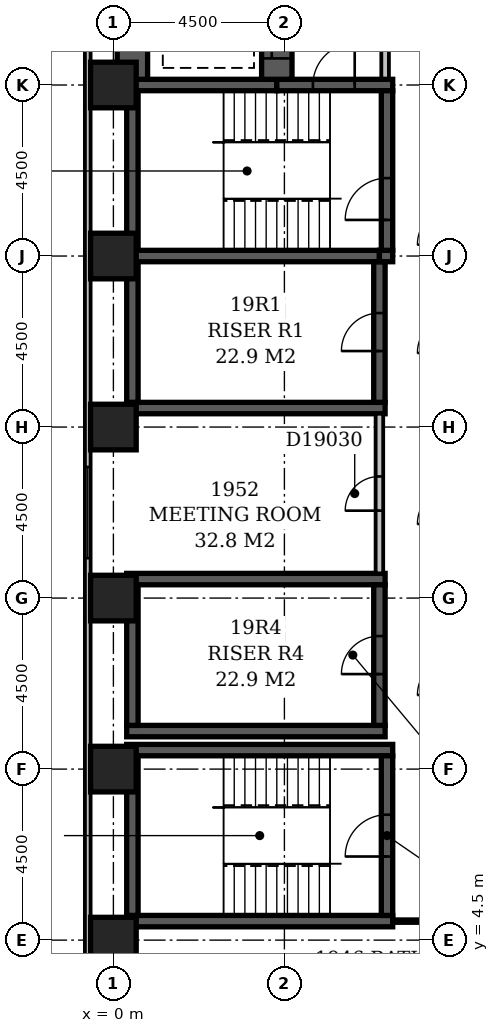
"""IFC4 building model, lengths in metres.
Left out: names, types, materials, properties, quantities, classifications, styles, units other than length and angle.
Written with IfcOpenShell. Run it as: python <this file> out.ifc"""

import sys

from ifc_helpers import new_model, si_unit, direction, frame, frame_2d, origin, origin_2d, place, context, subcontext, project, spatial, rectangle, extrude, element, fill, save


model = new_model("IFC4")
c1 = context("Model", 3, precision=1e-05, world=origin(), true_north=direction((0.0, 1.0)))
c2 = subcontext(c1, "Body", "Model", "MODEL_VIEW")
j1 = project(units=[si_unit("LENGTHUNIT", "METRE"), si_unit("PLANEANGLEUNIT", "RADIAN")], contexts=[c1])
p1 = place(None, origin())
s1 = spatial("IfcSite", under=j1, at=p1, CompositionType="ELEMENT")
p2 = place(p1, origin())
s2 = spatial("IfcBuilding", under=s1, at=p2, CompositionType="ELEMENT")
p3 = place(p2, frame((0.0, 0.0, 79.4)))
s3 = spatial("IfcBuildingStorey", under=s2, at=p3, CompositionType="ELEMENT", Elevation=79.4)
for number, where, z_axis, x_axis in (
    (1, (0.35, 5.0, -0.3), (0.0, 0.0, 1.0), (1.0, 0.0, 0.0)),
    (2, (0.35, 9.5, -0.3), (0.0, 0.0, 1.0), (1.0, 0.0, 0.0)),
):
    element("IfcWall", number, at=place(p3, frame(where, z_axis=z_axis, x_axis=x_axis)), inside=s3, PredefinedType="SHEAR", context=c2, shape_type="SweptSolid", body=[
        extrude(rectangle(XDim=7.0, YDim=0.3, at=frame_2d((3.5, 0.0))), origin(), (0.0, 0.0, 1.0), 3.6),
    ])
for number, where, z_axis, x_axis in (
    (3, (0.35, 10.0, -0.3), (0.0, 0.0, 1.0), (1.0, 0.0, 0.0)),
    (4, (0.35, 14.0, -0.3), (0.0, 0.0, 1.0), (1.0, 0.0, 0.0)),
    (5, (0.35, 18.5, -0.3), (0.0, 0.0, 1.0), (1.0, 0.0, 0.0)),
):
    element("IfcWall", number, at=place(p3, frame(where, z_axis=z_axis, x_axis=x_axis)), inside=s3, PredefinedType="SHEAR", context=c2, shape_type="SweptSolid", body=[
        extrude(rectangle(XDim=6.8, YDim=0.3, at=frame_2d((3.4, 0.0))), origin(), (0.0, 0.0, 1.0), 3.6),
    ])
p4 = place(p3, frame((0.35, 22.5, -0.3), z_axis=(0.0, 0.0, 1.0), x_axis=(1.0, 0.0, 0.0)))
e6 = element("IfcWall", 6, at=p4, inside=s3, PredefinedType="SHEAR", context=c2, shape_type="SweptSolid", body=[
    extrude(rectangle(XDim=6.65, YDim=0.3, at=frame_2d((3.325, 0.0))), origin(), (0.0, 0.0, 1.0), 3.6),
])
p5 = place(p3, frame((0.35, 27.0, -0.3), z_axis=(0.0, 0.0, 1.0), x_axis=(1.0, 0.0, 0.0)))
e7 = element("IfcWall", 7, at=p5, inside=s3, PredefinedType="SHEAR", context=c2, shape_type="SweptSolid", body=[
    extrude(rectangle(XDim=3.95, YDim=0.3, at=frame_2d((1.975, 0.0))), origin(), (0.0, 0.0, 1.0), 3.6),
])
p6 = place(p3, frame((0.5, 5.15, -0.3), z_axis=(0.0, 0.0, 1.0), x_axis=(0.0, 1.0, 0.0)))
e8 = element("IfcWall", 8, at=p6, inside=s3, PredefinedType="SHEAR", context=c2, shape_type="SweptSolid", body=[
    extrude(rectangle(XDim=4.2, YDim=0.3, at=frame_2d((2.1, 0.0))), origin(), (0.0, 0.0, 1.0), 3.6),
])
for number, where, z_axis, x_axis in (
    (9, (0.5, 10.15, -0.3), (0.0, 0.0, 1.0), (0.0, 1.0, 0.0)),
    (10, (0.5, 18.65, -0.3), (0.0, 0.0, 1.0), (0.0, 1.0, 0.0)),
):
    element("IfcWall", number, at=place(p3, frame(where, z_axis=z_axis, x_axis=x_axis)), inside=s3, PredefinedType="SHEAR", context=c2, shape_type="SweptSolid", body=[
        extrude(rectangle(XDim=3.7, YDim=0.3, at=frame_2d((1.85, 0.0))), origin(), (0.0, 0.0, 1.0), 3.6),
    ])
p7 = place(p3, frame((0.5, 22.65, -0.3), z_axis=(0.0, 0.0, 1.0), x_axis=(0.0, 1.0, 0.0)))
e11 = element("IfcWall", 11, at=p7, inside=s3, PredefinedType="SHEAR", context=c2, shape_type="SweptSolid", body=[
    extrude(rectangle(XDim=4.2, YDim=0.3, at=frame_2d((2.1, 0.0))), origin(), (0.0, 0.0, 1.0), 3.6),
])
p8 = place(p3, frame((0.5, 27.15, -0.3), z_axis=(0.0, 0.0, 1.0), x_axis=(0.0, 1.0, 0.0)))
e12 = element("IfcWall", 12, at=p8, inside=s3, PredefinedType="SHEAR", context=c2, shape_type="SweptSolid", body=[
    extrude(rectangle(XDim=6.95, YDim=0.8, at=frame_2d((3.475, 0.0))), origin(), (0.0, 0.0, 1.0), 3.6),
])
p9 = place(p3, frame((4.3, 27.0, -0.3), z_axis=(0.0, 0.0, 1.0), x_axis=(1.0, 0.0, 0.0)))
e13 = element("IfcWall", 13, at=p9, inside=s3, PredefinedType="SHEAR", context=c2, shape_type="SweptSolid", body=[
    extrude(rectangle(XDim=3.05, YDim=0.3, at=frame_2d((1.525, 0.0))), origin(), (0.0, 0.0, 1.0), 3.6),
])
p10 = place(p9, frame((0.95, 0.0, 0.3)))
e14 = element("IfcOpeningElement", 14, at=p10, cuts=e13, PredefinedType="OPENING", context=c2, shape_type="SweptSolid", body=[
    extrude(rectangle(XDim=1.1, YDim=2.1, at=frame_2d((0.55, 1.05))), frame((0.0, 0.162, 0.0), z_axis=(0.0, -1.0, 0.0), x_axis=(1.0, 0.0, 0.0)), (0.0, 0.0, 1.0), 0.324),
])
p11 = place(p3, frame((4.3, 27.15, -0.3), z_axis=(0.0, 0.0, 1.0), x_axis=(0.0, 1.0, 0.0)))
e15 = element("IfcWall", 15, at=p11, inside=s3, PredefinedType="SHEAR", context=c2, shape_type="SweptSolid", body=[
    extrude(rectangle(XDim=6.95, YDim=0.8, at=frame_2d((3.475, 0.0))), origin(), (0.0, 0.0, 1.0), 3.6),
])
p12 = place(p11, frame((3.05, 0.0, 0.3)))
e16 = element("IfcOpeningElement", 16, at=p12, cuts=e15, PredefinedType="OPENING", context=c2, shape_type="SweptSolid", body=[
    extrude(rectangle(XDim=1.1, YDim=2.1, at=frame_2d((0.55, 1.05))), frame((0.0, 0.412, 0.0), z_axis=(0.0, -1.0, 0.0), x_axis=(1.0, 0.0, 0.0)), (0.0, 0.0, 1.0), 0.824),
])
p13 = place(p11, frame((0.55, 0.0, 0.3)))
e17 = element("IfcOpeningElement", 17, at=p13, cuts=e15, PredefinedType="OPENING", context=c2, shape_type="SweptSolid", body=[
    extrude(rectangle(XDim=1.1, YDim=2.1, at=frame_2d((0.55, 1.05))), frame((0.0, 0.412, 0.0), z_axis=(0.0, -1.0, 0.0), x_axis=(1.0, 0.0, 0.0)), (0.0, 0.0, 1.0), 0.824),
])
p14 = place(p11, frame((5.35, 0.0, 0.3)))
e18 = element("IfcOpeningElement", 18, at=p14, cuts=e15, PredefinedType="OPENING", context=c2, shape_type="SweptSolid", body=[
    extrude(rectangle(XDim=1.1, YDim=2.1, at=frame_2d((0.55, 1.05))), frame((0.0, 0.412, 0.0), z_axis=(0.0, -1.0, 0.0), x_axis=(1.0, 0.0, 0.0)), (0.0, 0.0, 1.0), 0.824),
])
p15 = place(p3, frame((7.0, 10.15, -0.3), z_axis=(0.0, 0.0, 1.0), x_axis=(0.0, 1.0, 0.0)))
e19 = element("IfcWall", 19, at=p15, inside=s3, PredefinedType="SHEAR", context=c2, shape_type="SweptSolid", body=[
    extrude(rectangle(XDim=3.7, YDim=0.3, at=frame_2d((1.85, 0.0))), origin(), (0.0, 0.0, 1.0), 3.6),
])
p16 = place(p15, frame((1.35, 0.0, 0.3)))
e20 = element("IfcOpeningElement", 20, at=p16, cuts=e19, PredefinedType="OPENING", context=c2, shape_type="SweptSolid", body=[
    extrude(rectangle(XDim=1.0, YDim=2.1, at=frame_2d((0.5, 1.05))), frame((0.0, 0.162, 0.0), z_axis=(0.0, -1.0, 0.0), x_axis=(1.0, 0.0, 0.0)), (0.0, 0.0, 1.0), 0.324),
])
p17 = place(p3, frame((7.0, 18.65, -0.3), z_axis=(0.0, 0.0, 1.0), x_axis=(0.0, 1.0, 0.0)))
e21 = element("IfcWall", 21, at=p17, inside=s3, PredefinedType="SHEAR", context=c2, shape_type="SweptSolid", body=[
    extrude(rectangle(XDim=3.7, YDim=0.3, at=frame_2d((1.85, 0.0))), origin(), (0.0, 0.0, 1.0), 3.6),
])
p18 = place(p17, frame((1.35, 0.0, 0.3)))
e22 = element("IfcOpeningElement", 22, at=p18, cuts=e21, PredefinedType="OPENING", context=c2, shape_type="SweptSolid", body=[
    extrude(rectangle(XDim=1.0, YDim=2.1, at=frame_2d((0.5, 1.05))), frame((0.0, 0.162, 0.0), z_axis=(0.0, -1.0, 0.0), x_axis=(1.0, 0.0, 0.0)), (0.0, 0.0, 1.0), 0.324),
])
p19 = place(p3, frame((7.0, 22.5, -0.3), z_axis=(0.0, 0.0, 1.0), x_axis=(1.0, 0.0, 0.0)))
e23 = element("IfcWall", 23, at=p19, inside=s3, PredefinedType="SHEAR", context=c2, shape_type="SweptSolid", body=[
    extrude(rectangle(XDim=0.35, YDim=0.3, at=frame_2d((0.175, 0.0))), origin(), (0.0, 0.0, 1.0), 3.6),
])
p20 = place(p3, frame((7.2, 5.15, -0.3), z_axis=(0.0, 0.0, 1.0), x_axis=(0.0, 1.0, 0.0)))
e24 = element("IfcWall", 24, at=p20, inside=s3, PredefinedType="SHEAR", context=c2, shape_type="SweptSolid", body=[
    extrude(rectangle(XDim=4.2, YDim=0.3, at=frame_2d((2.1, 0.0))), origin(), (0.0, 0.0, 1.0), 3.6),
])
p21 = place(p20, frame((1.55, 0.0, 0.3)))
e25 = element("IfcOpeningElement", 25, at=p21, cuts=e24, PredefinedType="OPENING", context=c2, shape_type="SweptSolid", body=[
    extrude(rectangle(XDim=1.1, YDim=2.1, at=frame_2d((0.55, 1.05))), frame((0.0, 0.162, 0.0), z_axis=(0.0, -1.0, 0.0), x_axis=(1.0, 0.0, 0.0)), (0.0, 0.0, 1.0), 0.324),
])
p22 = place(p3, frame((7.2, 22.65, -0.3), z_axis=(0.0, 0.0, 1.0), x_axis=(0.0, 1.0, 0.0)))
e26 = element("IfcWall", 26, at=p22, inside=s3, PredefinedType="SHEAR", context=c2, shape_type="SweptSolid", body=[
    extrude(rectangle(XDim=4.2, YDim=0.3, at=frame_2d((2.1, 0.0))), origin(), (0.0, 0.0, 1.0), 3.6),
])
p23 = place(p22, frame((0.8, 0.0, 0.3)))
e27 = element("IfcOpeningElement", 27, at=p23, cuts=e26, PredefinedType="OPENING", context=c2, shape_type="SweptSolid", body=[
    extrude(rectangle(XDim=1.1, YDim=2.1, at=frame_2d((0.55, 1.05))), frame((0.0, 0.162, 0.0), z_axis=(0.0, -1.0, 0.0), x_axis=(1.0, 0.0, 0.0)), (0.0, 0.0, 1.0), 0.324),
])
for number, where, z_axis, x_axis in (
    (28, (0.0, 4.5, -0.3), (0.0, 0.0, 1.0), (1.0, 0.0, 0.0)),
    (29, (0.0, 9.0, -0.3), (0.0, 0.0, 1.0), (1.0, 0.0, 0.0)),
    (30, (0.0, 13.5, -0.3), (0.0, 0.0, 1.0), (1.0, 0.0, 0.0)),
    (31, (0.0, 18.0, -0.3), (0.0, 0.0, 1.0), (1.0, 0.0, 0.0)),
    (32, (0.0, 22.5, -0.3), (0.0, 0.0, 1.0), (1.0, 0.0, 0.0)),
    (33, (0.0, 27.0, -0.3), (0.0, 0.0, 1.0), (1.0, 0.0, 0.0)),
):
    element("IfcColumn", number, at=place(p3, frame(where, z_axis=z_axis, x_axis=x_axis)), inside=s3, PredefinedType="COLUMN", context=c2, shape_type="SweptSolid", body=[
        extrude(rectangle(XDim=1.2, YDim=1.2, at=origin_2d()), origin(), (0.0, 0.0, 1.0), 3.6),
    ])
p24 = place(p3, frame((-0.675, 59.1, 0.0), z_axis=(0.0, 0.0, 1.0), x_axis=(0.0, -1.0, 0.0)))
e34 = element("IfcWall", 34, at=p24, inside=s3, PredefinedType="STANDARD", context=c2, shape_type="SweptSolid", body=[
    extrude(rectangle(XDim=55.35, YDim=0.15, at=frame_2d((27.675, 0.0))), origin(), (0.0, 0.0, 1.0), 2.7),
])
p25 = place(p24, frame((10.65, 0.0, 0.6)))
e35 = element("IfcOpeningElement", 35, at=p25, cuts=e34, PredefinedType="OPENING", context=c2, shape_type="SweptSolid", body=[
    extrude(rectangle(XDim=2.4, YDim=1.8, at=frame_2d((1.2, 0.9))), frame((0.0, 0.087, 0.0), z_axis=(0.0, -1.0, 0.0), x_axis=(1.0, 0.0, 0.0)), (0.0, 0.0, 1.0), 0.174),
])
p26 = place(p24, frame((15.15, 0.0, 0.6)))
e36 = element("IfcOpeningElement", 36, at=p26, cuts=e34, PredefinedType="OPENING", context=c2, shape_type="SweptSolid", body=[
    extrude(rectangle(XDim=2.4, YDim=1.8, at=frame_2d((1.2, 0.9))), frame((0.0, 0.087, 0.0), z_axis=(0.0, -1.0, 0.0), x_axis=(1.0, 0.0, 0.0)), (0.0, 0.0, 1.0), 0.174),
])
p27 = place(p24, frame((42.15, 0.0, 0.6)))
e37 = element("IfcOpeningElement", 37, at=p27, cuts=e34, PredefinedType="OPENING", context=c2, shape_type="SweptSolid", body=[
    extrude(rectangle(XDim=2.4, YDim=1.8, at=frame_2d((1.2, 0.9))), frame((0.0, 0.087, 0.0), z_axis=(0.0, -1.0, 0.0), x_axis=(1.0, 0.0, 0.0)), (0.0, 0.0, 1.0), 0.174),
])
p28 = place(p3, frame((7.15, 27.17, 0.0), z_axis=(0.0, 0.0, 1.0), x_axis=(0.0, 1.0, 0.0)))
e38 = element("IfcWall", 38, at=p28, inside=s3, PredefinedType="PARTITIONING", context=c2, shape_type="SweptSolid", body=[
    extrude(rectangle(XDim=4.83, YDim=0.2, at=frame_2d((2.415, 0.0))), origin(), (0.0, 0.0, 1.0), 3.3),
])
p29 = place(p28, frame((1.73, 0.0, 0.0)))
e39 = element("IfcOpeningElement", 39, at=p29, cuts=e38, PredefinedType="OPENING", context=c2, shape_type="SweptSolid", body=[
    extrude(rectangle(XDim=1.2, YDim=2.1, at=frame_2d((0.6, 1.05))), frame((0.0, 0.112, 0.0), z_axis=(0.0, -1.0, 0.0), x_axis=(1.0, 0.0, 0.0)), (0.0, 0.0, 1.0), 0.224),
])
p30 = place(p3, frame((0.0, 4.4, 0.0), z_axis=(0.0, 0.0, 1.0), x_axis=(0.0, 1.0, 0.0)))
e40 = element("IfcWall", 40, at=p30, inside=s3, PredefinedType="PARTITIONING", context=c2, shape_type="SweptSolid", body=[
    extrude(rectangle(XDim=0.7, YDim=0.1, at=frame_2d((0.35, 0.0))), origin(), (0.0, 0.0, 1.0), 2.7),
])
p31 = place(p3, frame((7.349, 5.0, 0.0), z_axis=(0.0, 0.0, 1.0), x_axis=(1.0, 0.0, 0.0)))
e41 = element("IfcWall", 41, at=p31, inside=s3, PredefinedType="PARTITIONING", context=c2, shape_type="SweptSolid", body=[
    extrude(rectangle(XDim=1.551, YDim=0.1, at=frame_2d((0.775, 0.0))), origin(), (0.0, 0.0, 1.0), 3.3),
])
p32 = place(p3, frame((7.0, 14.15, 0.0), z_axis=(0.0, 0.0, 1.0), x_axis=(0.0, 1.0, 0.0)))
e42 = element("IfcWall", 42, at=p32, inside=s3, PredefinedType="PARTITIONING", context=c2, shape_type="SweptSolid", body=[
    extrude(rectangle(XDim=4.2, YDim=0.2, at=frame_2d((2.1, 0.0))), origin(), (0.0, 0.0, 1.0), 3.3),
])
p33 = place(p32, frame((1.65, 0.0, 0.0)))
e43 = element("IfcOpeningElement", 43, at=p33, cuts=e42, PredefinedType="OPENING", context=c2, shape_type="SweptSolid", body=[
    extrude(rectangle(XDim=0.9, YDim=2.1, at=frame_2d((0.45, 1.05))), frame((0.0, 0.112, 0.0), z_axis=(0.0, -1.0, 0.0), x_axis=(1.0, 0.0, 0.0)), (0.0, 0.0, 1.0), 0.224),
])
p34 = place(p27, origin())
e44 = element("IfcWindow", 44, at=p34, inside=s3, PartitioningType="SINGLE_PANEL", PredefinedType="WINDOW", context=c2, shape_type="SweptSolid", body=[
    extrude(rectangle(XDim=2.4, YDim=1.8, at=frame_2d((1.2, 0.9))), frame((0.0, 0.03, 0.0), z_axis=(0.0, -1.0, 0.0), x_axis=(1.0, 0.0, 0.0)), (0.0, 0.0, 1.0), 0.06),
])
fill(e37, e44)
p35 = place(p13, origin())
e45 = element("IfcDoor", 45, at=p35, inside=s3, OperationType="SLIDING_TO_LEFT", PredefinedType="DOOR", context=c2, shape_type="SweptSolid", body=[
    extrude(rectangle(XDim=1.1, YDim=2.1, at=frame_2d((0.55, 1.05))), frame((0.0, 0.025, 0.0), z_axis=(0.0, -1.0, 0.0), x_axis=(1.0, 0.0, 0.0)), (0.0, 0.0, 1.0), 0.05),
])
fill(e17, e45)
p36 = place(p18, origin())
e46 = element("IfcDoor", 46, at=p36, inside=s3, OperationType="SINGLE_SWING_LEFT", PredefinedType="DOOR", context=c2, shape_type="SweptSolid", body=[
    extrude(rectangle(XDim=1.0, YDim=2.1, at=frame_2d((0.5, 1.05))), frame((0.0, 0.025, 0.0), z_axis=(0.0, -1.0, 0.0), x_axis=(1.0, 0.0, 0.0)), (0.0, 0.0, 1.0), 0.05),
])
fill(e22, e46)
p37 = place(p16, origin())
e47 = element("IfcDoor", 47, at=p37, inside=s3, OperationType="SINGLE_SWING_LEFT", PredefinedType="DOOR", context=c2, shape_type="SweptSolid", body=[
    extrude(rectangle(XDim=1.0, YDim=2.1, at=frame_2d((0.5, 1.05))), frame((0.0, 0.025, 0.0), z_axis=(0.0, -1.0, 0.0), x_axis=(1.0, 0.0, 0.0)), (0.0, 0.0, 1.0), 0.05),
])
fill(e20, e47)
p38 = place(p10, frame((1.1, 0.0, 0.0), z_axis=(0.0, 0.0, 1.0), x_axis=(-1.0, 0.0, 0.0)))
e48 = element("IfcDoor", 48, at=p38, inside=s3, OperationType="SINGLE_SWING_LEFT", PredefinedType="DOOR", context=c2, shape_type="SweptSolid", body=[
    extrude(rectangle(XDim=1.1, YDim=2.1, at=frame_2d((0.55, 1.05))), frame((0.0, 0.025, 0.0), z_axis=(0.0, -1.0, 0.0), x_axis=(1.0, 0.0, 0.0)), (0.0, 0.0, 1.0), 0.05),
])
fill(e14, e48)
p39 = place(p23, origin())
e49 = element("IfcDoor", 49, at=p39, inside=s3, OperationType="SINGLE_SWING_LEFT", PredefinedType="DOOR", context=c2, shape_type="SweptSolid", body=[
    extrude(rectangle(XDim=1.1, YDim=2.1, at=frame_2d((0.55, 1.05))), frame((0.0, 0.025, 0.0), z_axis=(0.0, -1.0, 0.0), x_axis=(1.0, 0.0, 0.0)), (0.0, 0.0, 1.0), 0.05),
])
fill(e27, e49)
p40 = place(p21, origin())
e50 = element("IfcDoor", 50, at=p40, inside=s3, OperationType="SINGLE_SWING_LEFT", PredefinedType="DOOR", context=c2, shape_type="SweptSolid", body=[
    extrude(rectangle(XDim=1.1, YDim=2.1, at=frame_2d((0.55, 1.05))), frame((0.0, 0.025, 0.0), z_axis=(0.0, -1.0, 0.0), x_axis=(1.0, 0.0, 0.0)), (0.0, 0.0, 1.0), 0.05),
])
fill(e25, e50)
p41 = place(p33, origin())
e51 = element("IfcDoor", 51, at=p41, inside=s3, OperationType="SINGLE_SWING_LEFT", PredefinedType="DOOR", context=c2, shape_type="SweptSolid", body=[
    extrude(rectangle(XDim=0.9, YDim=2.1, at=frame_2d((0.45, 1.05))), frame((0.0, 0.025, 0.0), z_axis=(0.0, -1.0, 0.0), x_axis=(1.0, 0.0, 0.0)), (0.0, 0.0, 1.0), 0.05),
])
fill(e43, e51)
save(model, sys.argv[1])
